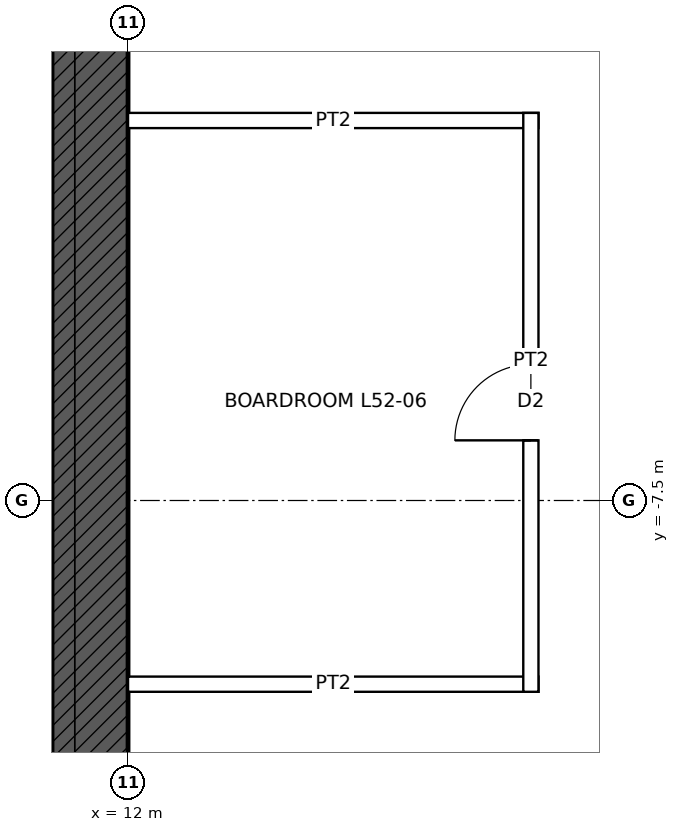
"""IFC4 building model, lengths in metres.
Left out: names, types, materials, properties, quantities, classifications, styles, units other than length and angle.
Written with IfcOpenShell. Run it as: python <this file> out.ifc"""

import sys

from ifc_helpers import new_model, si_unit, direction, frame, frame_2d, origin, place, context, subcontext, project, spatial, rectangle, extrude, element, fill, save


model = new_model("IFC4")
c1 = context("Model", 3, precision=1e-05, world=origin(), true_north=direction((0.0, 1.0)))
c2 = subcontext(c1, "Body", "Model", "MODEL_VIEW")
j1 = project(units=[si_unit("LENGTHUNIT", "METRE"), si_unit("PLANEANGLEUNIT", "RADIAN")], contexts=[c1])
p1 = place(None, origin())
s1 = spatial("IfcSite", under=j1, at=p1, CompositionType="ELEMENT")
p2 = place(p1, origin())
s2 = spatial("IfcBuilding", under=s1, at=p2, CompositionType="ELEMENT")
p3 = place(p2, frame((0.0, 0.0, 241.9)))
s3 = spatial("IfcBuildingStorey", under=s2, at=p3, CompositionType="ELEMENT", Elevation=241.9)
p4 = place(p3, frame((11.5, 11.0, 0.0), z_axis=(0.0, 0.0, 1.0), x_axis=(0.0, -1.0, 0.0)))
e1 = element("IfcWall", 1, at=p4, inside=s3, PredefinedType="SHEAR", context=c2, shape_type="SweptSolid", body=[
    extrude(rectangle(XDim=22.0, YDim=1.0, at=frame_2d((11.0, 0.0))), origin(), (0.0, 0.0, 1.0), 4.0),
])
p5 = place(p4, frame((10.5, 0.0, 0.0)))
e2 = element("IfcOpeningElement", 2, at=p5, cuts=e1, PredefinedType="OPENING", context=c2, shape_type="SweptSolid", body=[
    extrude(rectangle(XDim=1.0, YDim=2.4, at=frame_2d((0.5, 1.2))), frame((0.0, 0.51, 0.0), z_axis=(0.0, -1.0, 0.0), x_axis=(1.0, 0.0, 0.0)), (0.0, 0.0, 1.0), 1.02),
])
for number, where, z_axis, x_axis in (
    (3, (12.0, -9.917, 0.0), (0.0, 0.0, 1.0), (1.0, 0.0, 0.0)),
    (4, (12.0, -2.5, 0.0), (0.0, 0.0, 1.0), (1.0, 0.0, 0.0)),
):
    element("IfcWall", number, at=place(p3, frame(where, z_axis=z_axis, x_axis=x_axis)), inside=s3, PredefinedType="PARTITIONING", context=c2, shape_type="SweptSolid", body=[
        extrude(rectangle(XDim=5.4, YDim=0.2, at=frame_2d((2.7, 0.0))), origin(), (0.0, 0.0, 1.0), 3.85),
    ])
p6 = place(p3, frame((17.3, -10.017, 0.0), z_axis=(0.0, 0.0, 1.0), x_axis=(0.0, 1.0, 0.0)))
e5 = element("IfcWall", 5, at=p6, inside=s3, PredefinedType="PARTITIONING", context=c2, shape_type="SweptSolid", body=[
    extrude(rectangle(XDim=7.617, YDim=0.2, at=frame_2d((3.809, 0.0))), origin(), (0.0, 0.0, 1.0), 3.85),
])
p7 = place(p6, frame((3.309, 0.0, 0.0)))
e6 = element("IfcOpeningElement", 6, at=p7, cuts=e5, PredefinedType="OPENING", context=c2, shape_type="SweptSolid", body=[
    extrude(rectangle(XDim=1.0, YDim=2.1, at=frame_2d((0.5, 1.05))), frame((0.0, 0.11, 0.0), z_axis=(0.0, -1.0, 0.0), x_axis=(1.0, 0.0, 0.0)), (0.0, 0.0, 1.0), 0.22),
])
p8 = place(p7, origin())
e7 = element("IfcDoor", 7, at=p8, inside=s3, OperationType="SINGLE_SWING_LEFT", PredefinedType="DOOR", context=c2, shape_type="SweptSolid", body=[
    extrude(rectangle(XDim=1.0, YDim=2.1, at=frame_2d((0.5, 1.05))), frame((0.0, 0.025, 0.0), z_axis=(0.0, -1.0, 0.0), x_axis=(1.0, 0.0, 0.0)), (0.0, 0.0, 1.0), 0.05),
])
fill(e6, e7)
save(model, sys.argv[1])
